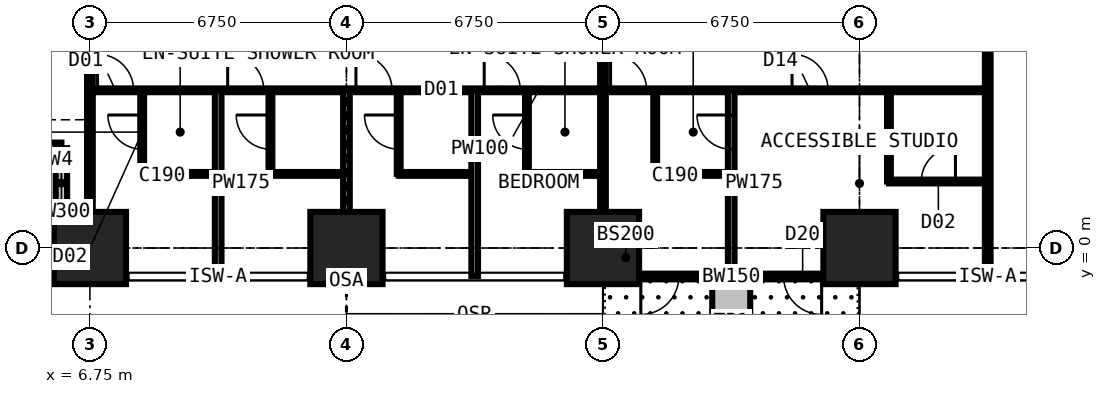
"""IFC4 building model, lengths in metres.
Left out: names, types, materials, properties, quantities, classifications, styles, units other than length and angle.
Written with IfcOpenShell. Run it as: python <this file> out.ifc"""

import sys

from ifc_helpers import new_model, si_unit, direction, frame, frame_2d, origin, origin_2d, place, context, subcontext, project, spatial, rectangle, extrude, element, fill, save


model = new_model("IFC4")
c1 = context("Model", 3, precision=1e-05, world=origin(), true_north=direction((0.0, 1.0)))
c2 = subcontext(c1, "Body", "Model", "MODEL_VIEW")
j1 = project(units=[si_unit("LENGTHUNIT", "METRE"), si_unit("PLANEANGLEUNIT", "RADIAN")], contexts=[c1])
p1 = place(None, origin())
s1 = spatial("IfcSite", under=j1, at=p1, CompositionType="ELEMENT")
p2 = place(p1, origin())
s2 = spatial("IfcBuilding", under=s1, at=p2, CompositionType="ELEMENT")
p3 = place(p2, frame((0.0, 0.0, 43.2)))
s3 = spatial("IfcBuildingStorey", under=s2, at=p3, CompositionType="ELEMENT", Elevation=43.2)
for number, where, z_axis, x_axis in (
    (1, (6.75, 0.0, 0.0), (0.0, 0.0, 1.0), (1.0, 0.0, 0.0)),
    (2, (13.5, 0.0, 0.0), (0.0, 0.0, 1.0), (1.0, 0.0, 0.0)),
    (3, (20.25, 0.0, 0.0), (0.0, 0.0, 1.0), (1.0, 0.0, 0.0)),
    (4, (27.0, 0.0, 0.0), (0.0, 0.0, 1.0), (1.0, 0.0, 0.0)),
):
    element("IfcColumn", number, at=place(p3, frame(where, z_axis=z_axis, x_axis=x_axis)), inside=s3, PredefinedType="COLUMN", context=c2, shape_type="SweptSolid", body=[
        extrude(rectangle(XDim=1.9, YDim=1.9, at=origin_2d()), origin(), (0.0, 0.0, 1.0), 3.6),
    ])
p4 = place(p3, frame((2.625, 2.625, 0.0), z_axis=(0.0, 0.0, 1.0), x_axis=(1.0, 0.0, 0.0)))
e5 = element("IfcWall", 5, at=p4, inside=s3, PredefinedType="SOLIDWALL", context=c2, shape_type="SweptSolid", body=[
    extrude(rectangle(XDim=3.375, YDim=0.3, at=frame_2d((1.688, 0.0))), origin(), (0.0, 0.0, 1.0), 3.375),
])
p5 = place(p4, frame((0.788, 0.0, 0.6)))
e6 = element("IfcOpeningElement", 6, at=p5, cuts=e5, PredefinedType="OPENING", context=c2, shape_type="SweptSolid", body=[
    extrude(rectangle(XDim=1.8, YDim=2.1, at=frame_2d((0.9, 1.05))), frame((0.0, 0.16, 0.0), z_axis=(0.0, -1.0, 0.0), x_axis=(1.0, 0.0, 0.0)), (0.0, 0.0, 1.0), 0.32),
])
p6 = place(p3, frame((6.0, 2.625, 0.0), z_axis=(0.0, 0.0, 1.0), x_axis=(0.0, -1.0, 0.0)))
e7 = element("IfcWall", 7, at=p6, inside=s3, PredefinedType="SOLIDWALL", context=c2, shape_type="SweptSolid", body=[
    extrude(rectangle(XDim=3.375, YDim=0.3, at=frame_2d((1.688, 0.0))), origin(), (0.0, 0.0, 1.0), 3.375),
])
p7 = place(p6, frame((0.317, 0.0, 0.9)))
e8 = element("IfcOpeningElement", 8, at=p7, cuts=e7, PredefinedType="OPENING", context=c2, shape_type="SweptSolid", body=[
    extrude(rectangle(XDim=1.2, YDim=1.8, at=frame_2d((0.6, 0.9))), frame((0.0, 0.16, 0.0), z_axis=(0.0, -1.0, 0.0), x_axis=(1.0, 0.0, 0.0)), (0.0, 0.0, 1.0), 0.32),
])
p8 = place(p3, frame((27.0, -0.75, 0.0), z_axis=(0.0, 0.0, 1.0), x_axis=(-1.0, 0.0, 0.0)))
e9 = element("IfcWall", 9, at=p8, inside=s3, PredefinedType="SOLIDWALL", context=c2, shape_type="SweptSolid", body=[
    extrude(rectangle(XDim=6.75, YDim=0.15, at=frame_2d((3.375, 0.0))), origin(), (0.0, 0.0, 1.0), 3.375),
])
p9 = place(p8, frame((0.996, 0.0, 0.0)))
e10 = element("IfcOpeningElement", 10, at=p9, cuts=e9, PredefinedType="OPENING", context=c2, shape_type="SweptSolid", body=[
    extrude(rectangle(XDim=1.0, YDim=2.2, at=frame_2d((0.5, 1.1))), frame((0.0, 0.085, 0.0), z_axis=(0.0, -1.0, 0.0), x_axis=(1.0, 0.0, 0.0)), (0.0, 0.0, 1.0), 0.17),
])
p10 = place(p8, frame((2.042, 0.0, 0.9)))
e11 = element("IfcOpeningElement", 11, at=p10, cuts=e9, PredefinedType="OPENING", context=c2, shape_type="SweptSolid", body=[
    extrude(rectangle(XDim=1.2, YDim=1.8, at=frame_2d((0.6, 0.9))), frame((0.0, 0.085, 0.0), z_axis=(0.0, -1.0, 0.0), x_axis=(1.0, 0.0, 0.0)), (0.0, 0.0, 1.0), 0.17),
])
p11 = place(p8, frame((4.754, 0.0, 0.0)))
e12 = element("IfcOpeningElement", 12, at=p11, cuts=e9, PredefinedType="OPENING", context=c2, shape_type="SweptSolid", body=[
    extrude(rectangle(XDim=1.0, YDim=2.2, at=frame_2d((0.5, 1.1))), frame((0.0, 0.085, 0.0), z_axis=(0.0, -1.0, 0.0), x_axis=(1.0, 0.0, 0.0)), (0.0, 0.0, 1.0), 0.17),
])
p12 = place(p8, frame((3.508, 0.0, 0.9)))
e13 = element("IfcOpeningElement", 13, at=p12, cuts=e9, PredefinedType="OPENING", context=c2, shape_type="SweptSolid", body=[
    extrude(rectangle(XDim=1.2, YDim=1.8, at=frame_2d((0.6, 0.9))), frame((0.0, 0.085, 0.0), z_axis=(0.0, -1.0, 0.0), x_axis=(1.0, 0.0, 0.0)), (0.0, 0.0, 1.0), 0.17),
])
p13 = place(p3, frame((23.625, -0.85, 0.0), z_axis=(0.0, 0.0, 1.0), x_axis=(0.0, -1.0, 0.0)))
e14 = element("IfcWall", 14, at=p13, inside=s3, PredefinedType="USERDEFINED", context=c2, shape_type="SweptSolid", body=[
    extrude(rectangle(XDim=2.2, YDim=1.0, at=frame_2d((1.1, 0.0))), origin(), (0.0, 0.0, 1.0), 0.9),
])
p14 = place(p3, frame((6.75, -0.734, 0.0), z_axis=(0.0, 0.0, 1.0), x_axis=(0.0, 1.0, 0.0)))
e15 = element("IfcWall", 15, at=p14, inside=s3, PredefinedType="PARTITIONING", context=c2, shape_type="SweptSolid", body=[
    extrude(rectangle(XDim=10.859, YDim=0.15, at=frame_2d((5.429, 0.0))), origin(), (0.0, 0.0, 1.0), 2.877),
])
p15 = place(p3, frame((6.75, 4.15, 0.0), z_axis=(0.0, 0.0, 1.0), x_axis=(1.0, 0.0, 0.0)))
e16 = element("IfcWall", 16, at=p15, inside=s3, PredefinedType="PARTITIONING", context=c2, shape_type="SweptSolid", body=[
    extrude(rectangle(XDim=23.625, YDim=0.1, at=frame_2d((11.812, 0.0))), origin(), (0.0, 0.0, 1.0), 3.375),
])
p16 = place(p15, frame((0.2, 0.0, 0.0)))
e17 = element("IfcOpeningElement", 17, at=p16, cuts=e16, PredefinedType="OPENING", context=c2, shape_type="SweptSolid", body=[
    extrude(rectangle(XDim=0.95, YDim=2.2, at=frame_2d((0.475, 1.1))), frame((0.0, 0.06, 0.0), z_axis=(0.0, -1.0, 0.0), x_axis=(1.0, 0.0, 0.0)), (0.0, 0.0, 1.0), 0.12),
])
p17 = place(p15, frame((3.625, 0.0, 0.0)))
e18 = element("IfcOpeningElement", 18, at=p17, cuts=e16, PredefinedType="OPENING", context=c2, shape_type="SweptSolid", body=[
    extrude(rectangle(XDim=0.95, YDim=2.2, at=frame_2d((0.475, 1.1))), frame((0.0, 0.06, 0.0), z_axis=(0.0, -1.0, 0.0), x_axis=(1.0, 0.0, 0.0)), (0.0, 0.0, 1.0), 0.12),
])
p18 = place(p15, frame((7.0, 0.0, 0.0)))
e19 = element("IfcOpeningElement", 19, at=p18, cuts=e16, PredefinedType="OPENING", context=c2, shape_type="SweptSolid", body=[
    extrude(rectangle(XDim=0.95, YDim=2.2, at=frame_2d((0.475, 1.1))), frame((0.0, 0.06, 0.0), z_axis=(0.0, -1.0, 0.0), x_axis=(1.0, 0.0, 0.0)), (0.0, 0.0, 1.0), 0.12),
])
p19 = place(p15, frame((10.375, 0.0, 0.0)))
e20 = element("IfcOpeningElement", 20, at=p19, cuts=e16, PredefinedType="OPENING", context=c2, shape_type="SweptSolid", body=[
    extrude(rectangle(XDim=0.95, YDim=2.2, at=frame_2d((0.475, 1.1))), frame((0.0, 0.06, 0.0), z_axis=(0.0, -1.0, 0.0), x_axis=(1.0, 0.0, 0.0)), (0.0, 0.0, 1.0), 0.12),
])
p20 = place(p15, frame((18.475, 0.0, 0.0)))
e21 = element("IfcOpeningElement", 21, at=p20, cuts=e16, PredefinedType="OPENING", context=c2, shape_type="SweptSolid", body=[
    extrude(rectangle(XDim=0.95, YDim=2.2, at=frame_2d((0.475, 1.1))), frame((0.0, 0.06, 0.0), z_axis=(0.0, -1.0, 0.0), x_axis=(1.0, 0.0, 0.0)), (0.0, 0.0, 1.0), 0.12),
])
p21 = place(p15, frame((13.7, 0.0, 0.0)))
e22 = element("IfcOpeningElement", 22, at=p21, cuts=e16, PredefinedType="OPENING", context=c2, shape_type="SweptSolid", body=[
    extrude(rectangle(XDim=0.95, YDim=2.2, at=frame_2d((0.475, 1.1))), frame((0.0, 0.06, 0.0), z_axis=(0.0, -1.0, 0.0), x_axis=(1.0, 0.0, 0.0)), (0.0, 0.0, 1.0), 0.12),
])
p22 = place(p3, frame((8.125, 1.95, 0.0), z_axis=(0.0, 0.0, 1.0), x_axis=(0.0, 1.0, 0.0)))
e23 = element("IfcWall", 23, at=p22, inside=s3, PredefinedType="PARTITIONING", context=c2, shape_type="SweptSolid", body=[
    extrude(rectangle(XDim=2.2, YDim=0.1, at=frame_2d((1.1, 0.0))), origin(), (0.0, 0.0, 1.0), 3.375),
])
p23 = place(p22, frame((0.65, 0.0, 0.0)))
e24 = element("IfcOpeningElement", 24, at=p23, cuts=e23, PredefinedType="OPENING", context=c2, shape_type="SweptSolid", body=[
    extrude(rectangle(XDim=0.9, YDim=2.2, at=frame_2d((0.45, 1.1))), frame((0.0, 0.06, 0.0), z_axis=(0.0, -1.0, 0.0), x_axis=(1.0, 0.0, 0.0)), (0.0, 0.0, 1.0), 0.12),
])
p24 = place(p3, frame((8.125, 1.95, 0.0), z_axis=(0.0, 0.0, 1.0), x_axis=(1.0, 0.0, 0.0)))
e25 = element("IfcWall", 25, at=p24, inside=s3, PredefinedType="PARTITIONING", context=c2, shape_type="SweptSolid", body=[
    extrude(rectangle(XDim=2.0, YDim=0.1, at=frame_2d((1.0, 0.0))), origin(), (0.0, 0.0, 1.0), 3.375),
])
p25 = place(p3, frame((10.125, -0.734, 0.0), z_axis=(0.0, 0.0, 1.0), x_axis=(0.0, 1.0, 0.0)))
e26 = element("IfcWall", 26, at=p25, inside=s3, PredefinedType="PARTITIONING", context=c2, shape_type="SweptSolid", body=[
    extrude(rectangle(XDim=4.884, YDim=0.175, at=frame_2d((2.442, 0.0))), origin(), (0.0, 0.0, 1.0), 3.375),
])
p26 = place(p3, frame((11.5, 1.95, 0.0), z_axis=(0.0, 0.0, 1.0), x_axis=(0.0, 1.0, 0.0)))
e27 = element("IfcWall", 27, at=p26, inside=s3, PredefinedType="PARTITIONING", context=c2, shape_type="SweptSolid", body=[
    extrude(rectangle(XDim=2.2, YDim=0.1, at=frame_2d((1.1, 0.0))), origin(), (0.0, 0.0, 1.0), 3.375),
])
p27 = place(p26, frame((0.65, 0.0, 0.0)))
e28 = element("IfcOpeningElement", 28, at=p27, cuts=e27, PredefinedType="OPENING", context=c2, shape_type="SweptSolid", body=[
    extrude(rectangle(XDim=0.9, YDim=2.2, at=frame_2d((0.45, 1.1))), frame((0.0, 0.06, 0.0), z_axis=(0.0, -1.0, 0.0), x_axis=(1.0, 0.0, 0.0)), (0.0, 0.0, 1.0), 0.12),
])
p28 = place(p3, frame((11.5, 1.95, 0.0), z_axis=(0.0, 0.0, 1.0), x_axis=(1.0, 0.0, 0.0)))
e29 = element("IfcWall", 29, at=p28, inside=s3, PredefinedType="PARTITIONING", context=c2, shape_type="SweptSolid", body=[
    extrude(rectangle(XDim=2.0, YDim=0.1, at=frame_2d((1.0, 0.0))), origin(), (0.0, 0.0, 1.0), 3.375),
])
p29 = place(p3, frame((13.5, -0.734, 0.0), z_axis=(0.0, 0.0, 1.0), x_axis=(0.0, 1.0, 0.0)))
e30 = element("IfcWall", 30, at=p29, inside=s3, PredefinedType="PARTITIONING", context=c2, shape_type="SweptSolid", body=[
    extrude(rectangle(XDim=4.884, YDim=0.175, at=frame_2d((2.442, 0.0))), origin(), (0.0, 0.0, 1.0), 2.61),
])
p30 = place(p3, frame((14.875, 1.95, 0.0), z_axis=(0.0, 0.0, 1.0), x_axis=(0.0, 1.0, 0.0)))
e31 = element("IfcWall", 31, at=p30, inside=s3, PredefinedType="PARTITIONING", context=c2, shape_type="SweptSolid", body=[
    extrude(rectangle(XDim=2.2, YDim=0.1, at=frame_2d((1.1, 0.0))), origin(), (0.0, 0.0, 1.0), 3.375),
])
p31 = place(p30, frame((0.65, 0.0, 0.0)))
e32 = element("IfcOpeningElement", 32, at=p31, cuts=e31, PredefinedType="OPENING", context=c2, shape_type="SweptSolid", body=[
    extrude(rectangle(XDim=0.9, YDim=2.2, at=frame_2d((0.45, 1.1))), frame((0.0, 0.06, 0.0), z_axis=(0.0, -1.0, 0.0), x_axis=(1.0, 0.0, 0.0)), (0.0, 0.0, 1.0), 0.12),
])
p32 = place(p3, frame((14.875, 1.95, 0.0), z_axis=(0.0, 0.0, 1.0), x_axis=(1.0, 0.0, 0.0)))
e33 = element("IfcWall", 33, at=p32, inside=s3, PredefinedType="PARTITIONING", context=c2, shape_type="SweptSolid", body=[
    extrude(rectangle(XDim=2.0, YDim=0.1, at=frame_2d((1.0, 0.0))), origin(), (0.0, 0.0, 1.0), 3.375),
])
p33 = place(p3, frame((16.875, -0.734, 0.0), z_axis=(0.0, 0.0, 1.0), x_axis=(0.0, 1.0, 0.0)))
e34 = element("IfcWall", 34, at=p33, inside=s3, PredefinedType="PARTITIONING", context=c2, shape_type="SweptSolid", body=[
    extrude(rectangle(XDim=4.884, YDim=0.175, at=frame_2d((2.442, 0.0))), origin(), (0.0, 0.0, 1.0), 3.375),
])
p34 = place(p3, frame((18.25, 1.95, 0.0), z_axis=(0.0, 0.0, 1.0), x_axis=(0.0, 1.0, 0.0)))
e35 = element("IfcWall", 35, at=p34, inside=s3, PredefinedType="PARTITIONING", context=c2, shape_type="SweptSolid", body=[
    extrude(rectangle(XDim=2.2, YDim=0.1, at=frame_2d((1.1, 0.0))), origin(), (0.0, 0.0, 1.0), 3.375),
])
p35 = place(p34, frame((0.65, 0.0, 0.0)))
e36 = element("IfcOpeningElement", 36, at=p35, cuts=e35, PredefinedType="OPENING", context=c2, shape_type="SweptSolid", body=[
    extrude(rectangle(XDim=0.9, YDim=2.2, at=frame_2d((0.45, 1.1))), frame((0.0, 0.06, 0.0), z_axis=(0.0, -1.0, 0.0), x_axis=(1.0, 0.0, 0.0)), (0.0, 0.0, 1.0), 0.12),
])
p36 = place(p3, frame((18.25, 1.95, 0.0), z_axis=(0.0, 0.0, 1.0), x_axis=(1.0, 0.0, 0.0)))
e37 = element("IfcWall", 37, at=p36, inside=s3, PredefinedType="PARTITIONING", context=c2, shape_type="SweptSolid", body=[
    extrude(rectangle(XDim=2.0, YDim=0.1, at=frame_2d((1.0, 0.0))), origin(), (0.0, 0.0, 1.0), 3.375),
])
p37 = place(p3, frame((20.25, -0.734, 0.0), z_axis=(0.0, 0.0, 1.0), x_axis=(0.0, 1.0, 0.0)))
e38 = element("IfcWall", 38, at=p37, inside=s3, PredefinedType="PARTITIONING", context=c2, shape_type="SweptSolid", body=[
    extrude(rectangle(XDim=12.034, YDim=0.15, at=frame_2d((6.017, 0.0))), origin(), (0.0, 0.0, 1.0), 2.61),
])
p38 = place(p3, frame((21.625, 1.95, 0.0), z_axis=(0.0, 0.0, 1.0), x_axis=(0.0, 1.0, 0.0)))
e39 = element("IfcWall", 39, at=p38, inside=s3, PredefinedType="PARTITIONING", context=c2, shape_type="SweptSolid", body=[
    extrude(rectangle(XDim=2.2, YDim=0.1, at=frame_2d((1.1, 0.0))), origin(), (0.0, 0.0, 1.0), 3.375),
])
p39 = place(p3, frame((21.625, 1.95, 0.0), z_axis=(0.0, 0.0, 1.0), x_axis=(1.0, 0.0, 0.0)))
e40 = element("IfcWall", 40, at=p39, inside=s3, PredefinedType="PARTITIONING", context=c2, shape_type="SweptSolid", body=[
    extrude(rectangle(XDim=2.0, YDim=0.1, at=frame_2d((1.0, 0.0))), origin(), (0.0, 0.0, 1.0), 3.375),
])
p40 = place(p3, frame((23.625, -0.734, 0.0), z_axis=(0.0, 0.0, 1.0), x_axis=(0.0, 1.0, 0.0)))
e41 = element("IfcWall", 41, at=p40, inside=s3, PredefinedType="PARTITIONING", context=c2, shape_type="SweptSolid", body=[
    extrude(rectangle(XDim=4.884, YDim=0.175, at=frame_2d((2.442, 0.0))), origin(), (0.0, 0.0, 1.0), 3.375),
])
p41 = place(p40, frame((3.334, 0.0, 0.0)))
e42 = element("IfcOpeningElement", 42, at=p41, cuts=e41, PredefinedType="OPENING", context=c2, shape_type="SweptSolid", body=[
    extrude(rectangle(XDim=0.9, YDim=2.2, at=frame_2d((0.45, 1.1))), frame((0.0, 0.097, 0.0), z_axis=(0.0, -1.0, 0.0), x_axis=(1.0, 0.0, 0.0)), (0.0, 0.0, 1.0), 0.195),
])
p42 = place(p3, frame((27.775, 1.75, 0.0), z_axis=(0.0, 0.0, 1.0), x_axis=(0.0, 1.0, 0.0)))
e43 = element("IfcWall", 43, at=p42, inside=s3, PredefinedType="PARTITIONING", context=c2, shape_type="SweptSolid", body=[
    extrude(rectangle(XDim=2.4, YDim=0.1, at=frame_2d((1.2, 0.0))), origin(), (0.0, 0.0, 1.0), 3.375),
])
p43 = place(p3, frame((27.775, 1.75, 0.0), z_axis=(0.0, 0.0, 1.0), x_axis=(1.0, 0.0, 0.0)))
e44 = element("IfcWall", 44, at=p43, inside=s3, PredefinedType="PARTITIONING", context=c2, shape_type="SweptSolid", body=[
    extrude(rectangle(XDim=2.6, YDim=0.1, at=frame_2d((1.3, 0.0))), origin(), (0.0, 0.0, 1.0), 3.375),
])
p44 = place(p43, frame((0.85, 0.0, 0.0)))
e45 = element("IfcOpeningElement", 45, at=p44, cuts=e44, PredefinedType="OPENING", context=c2, shape_type="SweptSolid", body=[
    extrude(rectangle(XDim=0.9, YDim=2.2, at=frame_2d((0.45, 1.1))), frame((0.0, 0.06, 0.0), z_axis=(0.0, -1.0, 0.0), x_axis=(1.0, 0.0, 0.0)), (0.0, 0.0, 1.0), 0.12),
])
p45 = place(p3, frame((30.375, -0.734, 0.0), z_axis=(0.0, 0.0, 1.0), x_axis=(0.0, 1.0, 0.0)))
e46 = element("IfcWall", 46, at=p45, inside=s3, PredefinedType="PARTITIONING", context=c2, shape_type="SweptSolid", body=[
    extrude(rectangle(XDim=12.034, YDim=0.15, at=frame_2d((6.017, 0.0))), origin(), (0.0, 0.0, 1.0), 3.375),
])
p46 = place(p7, origin())
e47 = element("IfcWindow", 47, at=p46, inside=s3, PartitioningType="SINGLE_PANEL", PredefinedType="WINDOW", context=c2, shape_type="SweptSolid", body=[
    extrude(rectangle(XDim=1.2, YDim=1.8, at=frame_2d((0.6, 0.9))), frame((0.0, 0.03, 0.0), z_axis=(0.0, -1.0, 0.0), x_axis=(1.0, 0.0, 0.0)), (0.0, 0.0, 1.0), 0.06),
])
fill(e8, e47)
p47 = place(p9, origin())
e48 = element("IfcDoor", 48, at=p47, inside=s3, OperationType="SINGLE_SWING_LEFT", PredefinedType="DOOR", context=c2, shape_type="SweptSolid", body=[
    extrude(rectangle(XDim=1.0, YDim=2.2, at=frame_2d((0.5, 1.1))), frame((0.0, 0.025, 0.0), z_axis=(0.0, -1.0, 0.0), x_axis=(1.0, 0.0, 0.0)), (0.0, 0.0, 1.0), 0.05),
])
fill(e10, e48)
p48 = place(p10, origin())
e49 = element("IfcWindow", 49, at=p48, inside=s3, PartitioningType="SINGLE_PANEL", PredefinedType="WINDOW", context=c2, shape_type="SweptSolid", body=[
    extrude(rectangle(XDim=1.2, YDim=1.8, at=frame_2d((0.6, 0.9))), frame((0.0, 0.03, 0.0), z_axis=(0.0, -1.0, 0.0), x_axis=(1.0, 0.0, 0.0)), (0.0, 0.0, 1.0), 0.06),
])
fill(e11, e49)
p49 = place(p11, origin())
e50 = element("IfcDoor", 50, at=p49, inside=s3, OperationType="SINGLE_SWING_RIGHT", PredefinedType="DOOR", context=c2, shape_type="SweptSolid", body=[
    extrude(rectangle(XDim=1.0, YDim=2.2, at=frame_2d((0.5, 1.1))), frame((0.0, 0.025, 0.0), z_axis=(0.0, -1.0, 0.0), x_axis=(1.0, 0.0, 0.0)), (0.0, 0.0, 1.0), 0.05),
])
fill(e12, e50)
p50 = place(p12, origin())
e51 = element("IfcWindow", 51, at=p50, inside=s3, PartitioningType="SINGLE_PANEL", PredefinedType="WINDOW", context=c2, shape_type="SweptSolid", body=[
    extrude(rectangle(XDim=1.2, YDim=1.8, at=frame_2d((0.6, 0.9))), frame((0.0, 0.03, 0.0), z_axis=(0.0, -1.0, 0.0), x_axis=(1.0, 0.0, 0.0)), (0.0, 0.0, 1.0), 0.06),
])
fill(e13, e51)
p51 = place(p16, origin())
e52 = element("IfcDoor", 52, at=p51, inside=s3, OperationType="SINGLE_SWING_LEFT", PredefinedType="DOOR", context=c2, shape_type="SweptSolid", body=[
    extrude(rectangle(XDim=0.95, YDim=2.2, at=frame_2d((0.475, 1.1))), frame((0.0, 0.025, 0.0), z_axis=(0.0, -1.0, 0.0), x_axis=(1.0, 0.0, 0.0)), (0.0, 0.0, 1.0), 0.05),
])
fill(e17, e52)
p52 = place(p23, origin())
e53 = element("IfcDoor", 53, at=p52, inside=s3, OperationType="SINGLE_SWING_RIGHT", PredefinedType="DOOR", context=c2, shape_type="SweptSolid", body=[
    extrude(rectangle(XDim=0.9, YDim=2.2, at=frame_2d((0.45, 1.1))), frame((0.0, 0.025, 0.0), z_axis=(0.0, -1.0, 0.0), x_axis=(1.0, 0.0, 0.0)), (0.0, 0.0, 1.0), 0.05),
])
fill(e24, e53)
p53 = place(p17, origin())
e54 = element("IfcDoor", 54, at=p53, inside=s3, OperationType="SINGLE_SWING_LEFT", PredefinedType="DOOR", context=c2, shape_type="SweptSolid", body=[
    extrude(rectangle(XDim=0.95, YDim=2.2, at=frame_2d((0.475, 1.1))), frame((0.0, 0.025, 0.0), z_axis=(0.0, -1.0, 0.0), x_axis=(1.0, 0.0, 0.0)), (0.0, 0.0, 1.0), 0.05),
])
fill(e18, e54)
p54 = place(p27, origin())
e55 = element("IfcDoor", 55, at=p54, inside=s3, OperationType="SINGLE_SWING_RIGHT", PredefinedType="DOOR", context=c2, shape_type="SweptSolid", body=[
    extrude(rectangle(XDim=0.9, YDim=2.2, at=frame_2d((0.45, 1.1))), frame((0.0, 0.025, 0.0), z_axis=(0.0, -1.0, 0.0), x_axis=(1.0, 0.0, 0.0)), (0.0, 0.0, 1.0), 0.05),
])
fill(e28, e55)
p55 = place(p18, origin())
e56 = element("IfcDoor", 56, at=p55, inside=s3, OperationType="SINGLE_SWING_LEFT", PredefinedType="DOOR", context=c2, shape_type="SweptSolid", body=[
    extrude(rectangle(XDim=0.95, YDim=2.2, at=frame_2d((0.475, 1.1))), frame((0.0, 0.025, 0.0), z_axis=(0.0, -1.0, 0.0), x_axis=(1.0, 0.0, 0.0)), (0.0, 0.0, 1.0), 0.05),
])
fill(e19, e56)
p56 = place(p31, origin())
e57 = element("IfcDoor", 57, at=p56, inside=s3, OperationType="SINGLE_SWING_RIGHT", PredefinedType="DOOR", context=c2, shape_type="SweptSolid", body=[
    extrude(rectangle(XDim=0.9, YDim=2.2, at=frame_2d((0.45, 1.1))), frame((0.0, 0.025, 0.0), z_axis=(0.0, -1.0, 0.0), x_axis=(1.0, 0.0, 0.0)), (0.0, 0.0, 1.0), 0.05),
])
fill(e32, e57)
p57 = place(p19, origin())
e58 = element("IfcDoor", 58, at=p57, inside=s3, OperationType="SINGLE_SWING_LEFT", PredefinedType="DOOR", context=c2, shape_type="SweptSolid", body=[
    extrude(rectangle(XDim=0.95, YDim=2.2, at=frame_2d((0.475, 1.1))), frame((0.0, 0.025, 0.0), z_axis=(0.0, -1.0, 0.0), x_axis=(1.0, 0.0, 0.0)), (0.0, 0.0, 1.0), 0.05),
])
fill(e20, e58)
p58 = place(p35, origin())
e59 = element("IfcDoor", 59, at=p58, inside=s3, OperationType="SINGLE_SWING_RIGHT", PredefinedType="DOOR", context=c2, shape_type="SweptSolid", body=[
    extrude(rectangle(XDim=0.9, YDim=2.2, at=frame_2d((0.45, 1.1))), frame((0.0, 0.025, 0.0), z_axis=(0.0, -1.0, 0.0), x_axis=(1.0, 0.0, 0.0)), (0.0, 0.0, 1.0), 0.05),
])
fill(e36, e59)
p59 = place(p20, origin())
e60 = element("IfcDoor", 60, at=p59, inside=s3, OperationType="SINGLE_SWING_LEFT", PredefinedType="DOOR", context=c2, shape_type="SweptSolid", body=[
    extrude(rectangle(XDim=0.95, YDim=2.2, at=frame_2d((0.475, 1.1))), frame((0.0, 0.025, 0.0), z_axis=(0.0, -1.0, 0.0), x_axis=(1.0, 0.0, 0.0)), (0.0, 0.0, 1.0), 0.05),
])
fill(e21, e60)
p60 = place(p44, origin())
e61 = element("IfcDoor", 61, at=p60, inside=s3, OperationType="SINGLE_SWING_RIGHT", PredefinedType="DOOR", context=c2, shape_type="SweptSolid", body=[
    extrude(rectangle(XDim=0.9, YDim=2.2, at=frame_2d((0.45, 1.1))), frame((0.0, 0.025, 0.0), z_axis=(0.0, -1.0, 0.0), x_axis=(1.0, 0.0, 0.0)), (0.0, 0.0, 1.0), 0.05),
])
fill(e45, e61)
p61 = place(p21, origin())
e62 = element("IfcDoor", 62, at=p61, inside=s3, OperationType="SINGLE_SWING_LEFT", PredefinedType="DOOR", context=c2, shape_type="SweptSolid", body=[
    extrude(rectangle(XDim=0.95, YDim=2.2, at=frame_2d((0.475, 1.1))), frame((0.0, 0.025, 0.0), z_axis=(0.0, -1.0, 0.0), x_axis=(1.0, 0.0, 0.0)), (0.0, 0.0, 1.0), 0.05),
])
fill(e22, e62)
p62 = place(p41, origin())
e63 = element("IfcDoor", 63, at=p62, inside=s3, OperationType="SINGLE_SWING_RIGHT", PredefinedType="DOOR", context=c2, shape_type="SweptSolid", body=[
    extrude(rectangle(XDim=0.9, YDim=2.2, at=frame_2d((0.45, 1.1))), frame((0.0, 0.025, 0.0), z_axis=(0.0, -1.0, 0.0), x_axis=(1.0, 0.0, 0.0)), (0.0, 0.0, 1.0), 0.05),
])
fill(e42, e63)
save(model, sys.argv[1])
